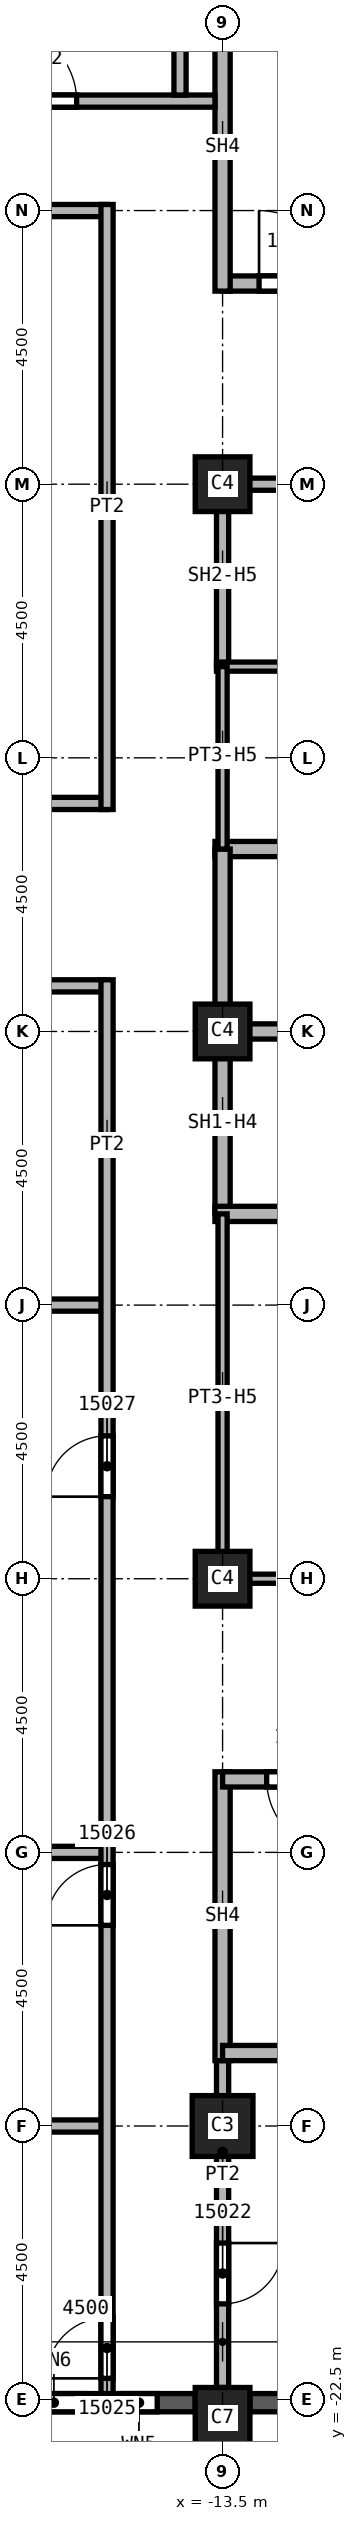
"""IFC4 building model, lengths in metres.
Left out: names, types, materials, properties, quantities, classifications, styles, units other than length and angle.
Written with IfcOpenShell. Run it as: python <this file> out.ifc"""

import sys

from ifc_helpers import new_model, si_unit, direction, frame, frame_2d, origin, origin_2d, place, context, subcontext, project, spatial, rectangle, extrude, element, fill, save


model = new_model("IFC4")
c1 = context("Model", 3, precision=1e-05, world=origin(), true_north=direction((0.0, 1.0)))
c2 = subcontext(c1, "Body", "Model", "MODEL_VIEW")
j1 = project(units=[si_unit("LENGTHUNIT", "METRE"), si_unit("PLANEANGLEUNIT", "RADIAN")], contexts=[c1])
p1 = place(None, origin())
s1 = spatial("IfcSite", under=j1, at=p1, CompositionType="ELEMENT")
p2 = place(p1, origin())
s2 = spatial("IfcBuilding", under=s1, at=p2, CompositionType="ELEMENT")
p3 = place(p2, frame((0.0, 0.0, 228.0)))
s3 = spatial("IfcBuildingStorey", under=s2, at=p3, CompositionType="ELEMENT", Elevation=228.0)
p4 = place(p3, frame((-13.5, -18.0, 0.0), z_axis=(0.0, 0.0, 1.0), x_axis=(1.0, 0.0, 0.0)))
e1 = element("IfcColumn", 1, at=p4, inside=s3, PredefinedType="COLUMN", context=c2, shape_type="SweptSolid", body=[
    extrude(rectangle(XDim=1.0, YDim=1.0, at=origin_2d()), origin(), (0.0, 0.0, 1.0), 3.72),
])
for number, where, z_axis, x_axis in (
    (2, (-13.5, 0.0, 0.0), (0.0, 0.0, 1.0), (1.0, 0.0, 0.0)),
    (3, (-13.5, 9.0, 0.0), (0.0, 0.0, 1.0), (1.0, 0.0, 0.0)),
    (4, (-13.5, -9.0, 0.0), (0.0, 0.0, 1.0), (1.0, 0.0, 0.0)),
):
    element("IfcColumn", number, at=place(p3, frame(where, z_axis=z_axis, x_axis=x_axis)), inside=s3, PredefinedType="COLUMN", context=c2, shape_type="SweptSolid", body=[
        extrude(rectangle(XDim=0.9, YDim=0.9, at=origin_2d()), origin(), (0.0, 0.0, 1.0), 3.72),
    ])
p5 = place(p3, frame((-13.5, -22.8, 0.0), z_axis=(0.0, 0.0, 1.0), x_axis=(1.0, 0.0, 0.0)))
e5 = element("IfcColumn", 5, at=p5, inside=s3, PredefinedType="COLUMN", context=c2, shape_type="SweptSolid", body=[
    extrude(rectangle(XDim=0.9, YDim=1.0, at=origin_2d()), origin(), (0.0, 0.0, 1.0), 3.72),
])
p6 = place(p3, frame((-17.55, -22.55, 0.0), z_axis=(0.0, 0.0, 1.0), x_axis=(1.0, 0.0, 0.0)))
e6 = element("IfcWall", 6, at=p6, inside=s3, PredefinedType="SOLIDWALL", context=c2, shape_type="SweptSolid", body=[
    extrude(rectangle(XDim=3.6, YDim=0.3, at=frame_2d((1.8, 0.0))), origin(), (0.0, 0.0, 1.0), 3.12),
])
p7 = place(p6, frame((0.775, 0.0, 0.8)))
e7 = element("IfcOpeningElement", 7, at=p7, cuts=e6, PredefinedType="OPENING", context=c2, shape_type="SweptSolid", body=[
    extrude(rectangle(XDim=1.0, YDim=1.95, at=frame_2d((0.5, 0.975))), frame((0.0, 0.15, 0.0), z_axis=(0.0, -1.0, 0.0), x_axis=(1.0, 0.0, 0.0)), (0.0, 0.0, 1.0), 0.3),
])
p8 = place(p6, frame((2.375, 0.0, 0.8)))
e8 = element("IfcOpeningElement", 8, at=p8, cuts=e6, PredefinedType="OPENING", context=c2, shape_type="SweptSolid", body=[
    extrude(rectangle(XDim=0.6, YDim=1.95, at=frame_2d((0.3, 0.975))), frame((0.0, 0.15, 0.0), z_axis=(0.0, -1.0, 0.0), x_axis=(1.0, 0.0, 0.0)), (0.0, 0.0, 1.0), 0.3),
])
p9 = place(p3, frame((-13.05, -22.55, 0.0), z_axis=(0.0, 0.0, 1.0), x_axis=(1.0, 0.0, 0.0)))
e9 = element("IfcWall", 9, at=p9, inside=s3, PredefinedType="SOLIDWALL", context=c2, shape_type="SweptSolid", body=[
    extrude(rectangle(XDim=3.6, YDim=0.3, at=frame_2d((1.8, 0.0))), origin(), (0.0, 0.0, 1.0), 3.12),
])
p10 = place(p9, frame((0.6, 0.0, 0.8)))
e10 = element("IfcOpeningElement", 10, at=p10, cuts=e9, PredefinedType="OPENING", context=c2, shape_type="SweptSolid", body=[
    extrude(rectangle(XDim=2.4, YDim=1.95, at=frame_2d((1.2, 0.975))), frame((0.0, 0.15, 0.0), z_axis=(0.0, -1.0, 0.0), x_axis=(1.0, 0.0, 0.0)), (0.0, 0.0, 1.0), 0.3),
])
p11 = place(p3, frame((-33.85, 3.75, 0.0), z_axis=(0.0, 0.0, 1.0), x_axis=(1.0, 0.0, 0.0)))
e11 = element("IfcWall", 11, at=p11, inside=s3, PredefinedType="PARTITIONING", context=c2, shape_type="SweptSolid", body=[
    extrude(rectangle(XDim=18.45, YDim=0.2, at=frame_2d((9.225, 0.0))), origin(), (0.0, 0.0, 1.0), 3.72),
])
p12 = place(p11, frame((11.2, 0.0, 0.0)))
e12 = element("IfcOpeningElement", 12, at=p12, cuts=e11, PredefinedType="OPENING", context=c2, shape_type="SweptSolid", body=[
    extrude(rectangle(XDim=1.0, YDim=2.1, at=frame_2d((0.5, 1.05))), frame((0.0, 0.1, 0.0), z_axis=(0.0, -1.0, 0.0), x_axis=(1.0, 0.0, 0.0)), (0.0, 0.0, 1.0), 0.2),
])
p13 = place(p3, frame((-15.4, 0.75, 0.0), z_axis=(0.0, 0.0, 1.0), x_axis=(-1.0, 0.0, 0.0)))
e13 = element("IfcWall", 13, at=p13, inside=s3, PredefinedType="PARTITIONING", context=c2, shape_type="SweptSolid", body=[
    extrude(rectangle(XDim=18.45, YDim=0.2, at=frame_2d((9.225, 0.0))), origin(), (0.0, 0.0, 1.0), 3.72),
])
p14 = place(p13, frame((5.35, 0.0, 0.0)))
e14 = element("IfcOpeningElement", 14, at=p14, cuts=e13, PredefinedType="OPENING", context=c2, shape_type="SweptSolid", body=[
    extrude(rectangle(XDim=1.0, YDim=2.1, at=frame_2d((0.5, 1.05))), frame((0.0, 0.1, 0.0), z_axis=(0.0, -1.0, 0.0), x_axis=(1.0, 0.0, 0.0)), (0.0, 0.0, 1.0), 0.2),
])
p15 = place(p13, frame((12.35, 0.0, 0.0)))
e15 = element("IfcOpeningElement", 15, at=p15, cuts=e13, PredefinedType="OPENING", context=c2, shape_type="SweptSolid", body=[
    extrude(rectangle(XDim=1.0, YDim=2.1, at=frame_2d((0.5, 1.05))), frame((0.0, 0.1, 0.0), z_axis=(0.0, -1.0, 0.0), x_axis=(1.0, 0.0, 0.0)), (0.0, 0.0, 1.0), 0.2),
])
p16 = place(p3, frame((-27.1, -4.5, 0.0), z_axis=(0.0, 0.0, 1.0), x_axis=(1.0, 0.0, 0.0)))
e16 = element("IfcWall", 16, at=p16, inside=s3, PredefinedType="PARTITIONING", context=c2, shape_type="SweptSolid", body=[
    extrude(rectangle(XDim=11.7, YDim=0.2, at=frame_2d((5.85, 0.0))), origin(), (0.0, 0.0, 1.0), 3.72),
])
p17 = place(p3, frame((-24.25, -18.0, 0.0), z_axis=(0.0, 0.0, 1.0), x_axis=(1.0, 0.0, 0.0)))
e17 = element("IfcWall", 17, at=p17, inside=s3, PredefinedType="PARTITIONING", context=c2, shape_type="SweptSolid", body=[
    extrude(rectangle(XDim=8.85, YDim=0.2, at=frame_2d((4.425, 0.0))), origin(), (0.0, 0.0, 1.0), 3.72),
])
p18 = place(p3, frame((-20.75, -13.5, 0.0), z_axis=(0.0, 0.0, 1.0), x_axis=(1.0, 0.0, 0.0)))
e18 = element("IfcWall", 18, at=p18, inside=s3, PredefinedType="PARTITIONING", context=c2, shape_type="SweptSolid", body=[
    extrude(rectangle(XDim=5.35, YDim=0.2, at=frame_2d((2.675, 0.0))), origin(), (0.0, 0.0, 1.0), 3.72),
])
p19 = place(p3, frame((-15.4, 13.5, 0.0), z_axis=(0.0, 0.0, 1.0), x_axis=(-1.0, 0.0, 0.0)))
e19 = element("IfcWall", 19, at=p19, inside=s3, PredefinedType="PARTITIONING", context=c2, shape_type="SweptSolid", body=[
    extrude(rectangle(XDim=6.6, YDim=0.2, at=frame_2d((3.3, 0.0))), origin(), (0.0, 0.0, 1.0), 3.72),
])
p20 = place(p19, frame((5.37, 0.0, 0.0)))
e20 = element("IfcOpeningElement", 20, at=p20, cuts=e19, PredefinedType="OPENING", context=c2, shape_type="SweptSolid", body=[
    extrude(rectangle(XDim=0.9, YDim=2.1, at=frame_2d((0.45, 1.05))), frame((0.0, 0.1, 0.0), z_axis=(0.0, -1.0, 0.0), x_axis=(1.0, 0.0, 0.0)), (0.0, 0.0, 1.0), 0.2),
])
p21 = place(p3, frame((-15.4, -22.4, 0.0), z_axis=(0.0, 0.0, 1.0), x_axis=(0.0, 1.0, 0.0)))
e21 = element("IfcWall", 21, at=p21, inside=s3, PredefinedType="PARTITIONING", context=c2, shape_type="SweptSolid", body=[
    extrude(rectangle(XDim=23.25, YDim=0.2, at=frame_2d((11.625, 0.0))), origin(), (0.0, 0.0, 1.0), 3.72),
])
p22 = place(p21, frame((0.25, 0.0, 0.0)))
e22 = element("IfcOpeningElement", 22, at=p22, cuts=e21, PredefinedType="OPENING", context=c2, shape_type="SweptSolid", body=[
    extrude(rectangle(XDim=1.0, YDim=2.1, at=frame_2d((0.5, 1.05))), frame((0.0, 0.1, 0.0), z_axis=(0.0, -1.0, 0.0), x_axis=(1.0, 0.0, 0.0)), (0.0, 0.0, 1.0), 0.2),
])
p23 = place(p21, frame((7.7, 0.0, 0.0)))
e23 = element("IfcOpeningElement", 23, at=p23, cuts=e21, PredefinedType="OPENING", context=c2, shape_type="SweptSolid", body=[
    extrude(rectangle(XDim=1.0, YDim=2.1, at=frame_2d((0.5, 1.05))), frame((0.0, 0.1, 0.0), z_axis=(0.0, -1.0, 0.0), x_axis=(1.0, 0.0, 0.0)), (0.0, 0.0, 1.0), 0.2),
])
p24 = place(p21, frame((14.75, 0.0, 0.0)))
e24 = element("IfcOpeningElement", 24, at=p24, cuts=e21, PredefinedType="OPENING", context=c2, shape_type="SweptSolid", body=[
    extrude(rectangle(XDim=1.0, YDim=2.1, at=frame_2d((0.5, 1.05))), frame((0.0, 0.1, 0.0), z_axis=(0.0, -1.0, 0.0), x_axis=(1.0, 0.0, 0.0)), (0.0, 0.0, 1.0), 0.2),
])
p25 = place(p3, frame((-15.4, 3.65, 0.0), z_axis=(0.0, 0.0, 1.0), x_axis=(0.0, 1.0, 0.0)))
e25 = element("IfcWall", 25, at=p25, inside=s3, PredefinedType="PARTITIONING", context=c2, shape_type="SweptSolid", body=[
    extrude(rectangle(XDim=9.95, YDim=0.2, at=frame_2d((4.975, 0.0))), origin(), (0.0, 0.0, 1.0), 3.72),
])
p26 = place(p3, frame((-13.5, -16.675, 0.0), z_axis=(0.0, 0.0, 1.0), x_axis=(0.0, -1.0, 0.0)))
e26 = element("IfcWall", 26, at=p26, inside=s3, PredefinedType="PARTITIONING", context=c2, shape_type="SweptSolid", body=[
    extrude(rectangle(XDim=5.625, YDim=0.2, at=frame_2d((2.812, 0.0))), origin(), (0.0, 0.0, 1.0), 3.72),
])
p27 = place(p26, frame((3.25, 0.0, 0.0)))
e27 = element("IfcOpeningElement", 27, at=p27, cuts=e26, PredefinedType="OPENING", context=c2, shape_type="SweptSolid", body=[
    extrude(rectangle(XDim=1.0, YDim=2.1, at=frame_2d((0.5, 1.05))), frame((0.0, 0.1, 0.0), z_axis=(0.0, -1.0, 0.0), x_axis=(1.0, 0.0, 0.0)), (0.0, 0.0, 1.0), 0.2),
])
p28 = place(p3, frame((-13.5, 6.0, 0.0), z_axis=(0.0, 0.0, 1.0), x_axis=(0.0, 1.0, 0.0)))
e28 = element("IfcWall", 28, at=p28, inside=s3, PredefinedType="SOLIDWALL", context=c2, shape_type="SweptSolid", body=[
    extrude(rectangle(XDim=3.1, YDim=0.2, at=frame_2d((1.55, 0.0))), origin(), (0.0, 0.0, 1.0), 2.958),
])
p29 = place(p3, frame((-13.5, 9.0, 0.0), z_axis=(0.0, 0.0, 1.0), x_axis=(1.0, 0.0, 0.0)))
e29 = element("IfcWall", 29, at=p29, inside=s3, PredefinedType="SOLIDWALL", context=c2, shape_type="SweptSolid", body=[
    extrude(rectangle(XDim=3.0, YDim=0.2, at=frame_2d((1.5, 0.0))), origin(), (0.0, 0.0, 1.0), 2.958),
])
p30 = place(p3, frame((-13.625, 0.0, 0.0), z_axis=(0.0, 0.0, 1.0), x_axis=(1.0, 0.0, 0.0)))
e30 = element("IfcWall", 30, at=p30, inside=s3, PredefinedType="SOLIDWALL", context=c2, shape_type="SweptSolid", body=[
    extrude(rectangle(XDim=3.125, YDim=0.25, at=frame_2d((1.562, 0.0))), origin(), (0.0, 0.0, 1.0), 3.72),
])
p31 = place(p3, frame((-13.625, 3.0, 0.0), z_axis=(0.0, 0.0, 1.0), x_axis=(1.0, 0.0, 0.0)))
e31 = element("IfcWall", 31, at=p31, inside=s3, PredefinedType="SOLIDWALL", context=c2, shape_type="SweptSolid", body=[
    extrude(rectangle(XDim=9.25, YDim=0.25, at=frame_2d((4.625, 0.0))), origin(), (0.0, 0.0, 1.0), 3.72),
])
p32 = place(p31, frame((3.25, 0.0, 0.0)))
e32 = element("IfcOpeningElement", 32, at=p32, cuts=e31, PredefinedType="OPENING", context=c2, shape_type="SweptSolid", body=[
    extrude(rectangle(XDim=1.1, YDim=2.1, at=frame_2d((0.55, 1.05))), frame((0.0, 0.125, 0.0), z_axis=(0.0, -1.0, 0.0), x_axis=(1.0, 0.0, 0.0)), (0.0, 0.0, 1.0), 0.25),
])
p33 = place(p3, frame((-13.5, -3.0, 0.0), z_axis=(0.0, 0.0, 1.0), x_axis=(0.0, 1.0, 0.0)))
e33 = element("IfcWall", 33, at=p33, inside=s3, PredefinedType="SOLIDWALL", context=c2, shape_type="SweptSolid", body=[
    extrude(rectangle(XDim=6.0, YDim=0.25, at=frame_2d((3.0, 0.0))), origin(), (0.0, 0.0, 1.0), 2.958),
])
p34 = place(p3, frame((-13.625, -3.0, 0.0), z_axis=(0.0, 0.0, 1.0), x_axis=(1.0, 0.0, 0.0)))
e34 = element("IfcWall", 34, at=p34, inside=s3, PredefinedType="SOLIDWALL", context=c2, shape_type="SweptSolid", body=[
    extrude(rectangle(XDim=6.125, YDim=0.25, at=frame_2d((3.062, 0.0))), origin(), (0.0, 0.0, 1.0), 3.72),
])
p35 = place(p34, frame((3.25, 0.0, 0.0)))
e35 = element("IfcOpeningElement", 35, at=p35, cuts=e34, PredefinedType="OPENING", context=c2, shape_type="SweptSolid", body=[
    extrude(rectangle(XDim=1.1, YDim=2.1, at=frame_2d((0.55, 1.05))), frame((0.0, 0.125, 0.0), z_axis=(0.0, -1.0, 0.0), x_axis=(1.0, 0.0, 0.0)), (0.0, 0.0, 1.0), 0.25),
])
p36 = place(p3, frame((-13.5, -12.175, 0.0), z_axis=(0.0, 0.0, 1.0), x_axis=(0.0, -1.0, 0.0)))
e36 = element("IfcWall", 36, at=p36, inside=s3, PredefinedType="SOLIDWALL", context=c2, shape_type="SweptSolid", body=[
    extrude(rectangle(XDim=4.75, YDim=0.25, at=frame_2d((2.375, 0.0))), origin(), (0.0, 0.0, 1.0), 3.72),
])
p37 = place(p3, frame((-13.5, 12.3, 0.0), z_axis=(0.0, 0.0, 1.0), x_axis=(1.0, 0.0, 0.0)))
e37 = element("IfcWall", 37, at=p37, inside=s3, PredefinedType="SOLIDWALL", context=c2, shape_type="SweptSolid", body=[
    extrude(rectangle(XDim=9.125, YDim=0.25, at=frame_2d((4.562, 0.0))), origin(), (0.0, 0.0, 1.0), 3.72),
])
p38 = place(p37, frame((0.6, 0.0, 0.0)))
e38 = element("IfcOpeningElement", 38, at=p38, cuts=e37, PredefinedType="OPENING", context=c2, shape_type="SweptSolid", body=[
    extrude(rectangle(XDim=1.2, YDim=2.1, at=frame_2d((0.6, 1.05))), frame((0.0, 0.125, 0.0), z_axis=(0.0, -1.0, 0.0), x_axis=(1.0, 0.0, 0.0)), (0.0, 0.0, 1.0), 0.25),
])
p39 = place(p3, frame((-13.5, 16.78, 0.0), z_axis=(0.0, 0.0, 1.0), x_axis=(0.0, -1.0, 0.0)))
e39 = element("IfcWall", 39, at=p39, inside=s3, PredefinedType="SOLIDWALL", context=c2, shape_type="SweptSolid", body=[
    extrude(rectangle(XDim=4.605, YDim=0.25, at=frame_2d((2.302, 0.0))), origin(), (0.0, 0.0, 1.0), 3.72),
])
p40 = place(p3, frame((-4.5, -16.8, 0.0), z_axis=(0.0, 0.0, 1.0), x_axis=(-1.0, 0.0, 0.0)))
e40 = element("IfcWall", 40, at=p40, inside=s3, PredefinedType="SOLIDWALL", context=c2, shape_type="SweptSolid", body=[
    extrude(rectangle(XDim=9.0, YDim=0.25, at=frame_2d((4.5, 0.0))), origin(), (0.0, 0.0, 1.0), 3.72),
])
p41 = place(p3, frame((-4.375, -12.3, 0.0), z_axis=(0.0, 0.0, 1.0), x_axis=(-1.0, 0.0, 0.0)))
e41 = element("IfcWall", 41, at=p41, inside=s3, PredefinedType="SOLIDWALL", context=c2, shape_type="SweptSolid", body=[
    extrude(rectangle(XDim=9.125, YDim=0.25, at=frame_2d((4.562, 0.0))), origin(), (0.0, 0.0, 1.0), 3.72),
])
p42 = place(p41, frame((7.2, 0.0, 0.0)))
e42 = element("IfcOpeningElement", 42, at=p42, cuts=e41, PredefinedType="OPENING", context=c2, shape_type="SweptSolid", body=[
    extrude(rectangle(XDim=1.2, YDim=2.1, at=frame_2d((0.6, 1.05))), frame((0.0, 0.125, 0.0), z_axis=(0.0, -1.0, 0.0), x_axis=(1.0, 0.0, 0.0)), (0.0, 0.0, 1.0), 0.25),
])
p43 = place(p3, frame((-13.6, 6.0, 0.0), z_axis=(0.0, 0.0, 1.0), x_axis=(1.0, 0.0, 0.0)))
e43 = element("IfcWall", 43, at=p43, inside=s3, PredefinedType="PARTITIONING", context=c2, shape_type="SweptSolid", body=[
    extrude(rectangle(XDim=3.1, YDim=0.15, at=frame_2d((1.55, 0.0))), origin(), (0.0, 0.0, 1.0), 3.72),
])
p44 = place(p3, frame((-13.5, -9.075, 0.0), z_axis=(0.0, 0.0, 1.0), x_axis=(0.0, 1.0, 0.0)))
e44 = element("IfcWall", 44, at=p44, inside=s3, PredefinedType="PARTITIONING", context=c2, shape_type="SweptSolid", body=[
    extrude(rectangle(XDim=6.075, YDim=0.15, at=frame_2d((3.038, 0.0))), origin(), (0.0, 0.0, 1.0), 2.958),
])
for number, where, z_axis, x_axis in (
    (45, (-13.5, 3.0, 0.0), (0.0, 0.0, 1.0), (0.0, 1.0, 0.0)),
    (46, (-10.5, -9.0, 0.0), (0.0, 0.0, 1.0), (-1.0, 0.0, 0.0)),
):
    element("IfcWall", number, at=place(p3, frame(where, z_axis=z_axis, x_axis=x_axis)), inside=s3, PredefinedType="PARTITIONING", context=c2, shape_type="SweptSolid", body=[
        extrude(rectangle(XDim=3.0, YDim=0.15, at=frame_2d((1.5, 0.0))), origin(), (0.0, 0.0, 1.0), 2.958),
    ])
p45 = place(p3, frame((-21.9, 15.3, 0.0), z_axis=(0.0, 0.0, 1.0), x_axis=(1.0, 0.0, 0.0)))
e47 = element("IfcWall", 47, at=p45, inside=s3, PredefinedType="SOLIDWALL", context=c2, shape_type="SweptSolid", body=[
    extrude(rectangle(XDim=8.275, YDim=0.2, at=frame_2d((4.137, 0.0))), origin(), (0.0, 0.0, 1.0), 3.72),
])
p46 = place(p45, frame((4.8, 0.0, 0.0)))
e48 = element("IfcOpeningElement", 48, at=p46, cuts=e47, PredefinedType="OPENING", context=c2, shape_type="SweptSolid", body=[
    extrude(rectangle(XDim=1.2, YDim=2.1, at=frame_2d((0.6, 1.05))), frame((0.0, 0.1, 0.0), z_axis=(0.0, -1.0, 0.0), x_axis=(1.0, 0.0, 0.0)), (0.0, 0.0, 1.0), 0.2),
])
p47 = place(p3, frame((-14.2, 15.4, 0.0), z_axis=(0.0, 0.0, 1.0), x_axis=(0.0, 1.0, 0.0)))
e49 = element("IfcWall", 49, at=p47, inside=s3, PredefinedType="SOLIDWALL", context=c2, shape_type="SweptSolid", body=[
    extrude(rectangle(XDim=5.9, YDim=0.2, at=frame_2d((2.95, 0.0))), origin(), (0.0, 0.0, 1.0), 3.72),
])
p48 = place(p38, origin())
e50 = element("IfcDoor", 50, at=p48, inside=s3, OperationType="SINGLE_SWING_RIGHT", PredefinedType="DOOR", context=c2, shape_type="SweptSolid", body=[
    extrude(rectangle(XDim=1.2, YDim=2.1, at=frame_2d((0.6, 1.05))), frame((0.0, 0.025, 0.0), z_axis=(0.0, -1.0, 0.0), x_axis=(1.0, 0.0, 0.0)), (0.0, 0.0, 1.0), 0.05),
])
fill(e38, e50)
p49 = place(p42, origin())
e51 = element("IfcDoor", 51, at=p49, inside=s3, OperationType="SINGLE_SWING_LEFT", PredefinedType="DOOR", context=c2, shape_type="SweptSolid", body=[
    extrude(rectangle(XDim=1.2, YDim=2.1, at=frame_2d((0.6, 1.05))), frame((0.0, 0.025, 0.0), z_axis=(0.0, -1.0, 0.0), x_axis=(1.0, 0.0, 0.0)), (0.0, 0.0, 1.0), 0.05),
])
fill(e42, e51)
p50 = place(p27, origin())
e52 = element("IfcDoor", 52, at=p50, inside=s3, OperationType="SINGLE_SWING_LEFT", PredefinedType="DOOR", context=c2, shape_type="SweptSolid", body=[
    extrude(rectangle(XDim=1.0, YDim=2.1, at=frame_2d((0.5, 1.05))), frame((0.0, 0.025, 0.0), z_axis=(0.0, -1.0, 0.0), x_axis=(1.0, 0.0, 0.0)), (0.0, 0.0, 1.0), 0.05),
])
fill(e27, e52)
p51 = place(p22, origin())
e53 = element("IfcDoor", 53, at=p51, inside=s3, OperationType="SINGLE_SWING_RIGHT", PredefinedType="DOOR", context=c2, shape_type="SweptSolid", body=[
    extrude(rectangle(XDim=1.0, YDim=2.1, at=frame_2d((0.5, 1.05))), frame((0.0, 0.025, 0.0), z_axis=(0.0, -1.0, 0.0), x_axis=(1.0, 0.0, 0.0)), (0.0, 0.0, 1.0), 0.05),
])
fill(e22, e53)
p52 = place(p23, origin())
e54 = element("IfcDoor", 54, at=p52, inside=s3, OperationType="SINGLE_SWING_LEFT", PredefinedType="DOOR", context=c2, shape_type="SweptSolid", body=[
    extrude(rectangle(XDim=1.0, YDim=2.1, at=frame_2d((0.5, 1.05))), frame((0.0, 0.025, 0.0), z_axis=(0.0, -1.0, 0.0), x_axis=(1.0, 0.0, 0.0)), (0.0, 0.0, 1.0), 0.05),
])
fill(e23, e54)
p53 = place(p24, origin())
e55 = element("IfcDoor", 55, at=p53, inside=s3, OperationType="SINGLE_SWING_RIGHT", PredefinedType="DOOR", context=c2, shape_type="SweptSolid", body=[
    extrude(rectangle(XDim=1.0, YDim=2.1, at=frame_2d((0.5, 1.05))), frame((0.0, 0.025, 0.0), z_axis=(0.0, -1.0, 0.0), x_axis=(1.0, 0.0, 0.0)), (0.0, 0.0, 1.0), 0.05),
])
fill(e24, e55)
p54 = place(p46, origin())
e56 = element("IfcDoor", 56, at=p54, inside=s3, OperationType="SINGLE_SWING_RIGHT", PredefinedType="DOOR", context=c2, shape_type="SweptSolid", body=[
    extrude(rectangle(XDim=1.2, YDim=2.1, at=frame_2d((0.6, 1.05))), frame((0.0, 0.025, 0.0), z_axis=(0.0, -1.0, 0.0), x_axis=(1.0, 0.0, 0.0)), (0.0, 0.0, 1.0), 0.05),
])
fill(e48, e56)
p55 = place(p7, origin())
e57 = element("IfcWindow", 57, at=p55, inside=s3, PartitioningType="SINGLE_PANEL", PredefinedType="WINDOW", context=c2, shape_type="SweptSolid", body=[
    extrude(rectangle(XDim=1.0, YDim=1.95, at=frame_2d((0.5, 0.975))), frame((0.0, 0.03, 0.0), z_axis=(0.0, -1.0, 0.0), x_axis=(1.0, 0.0, 0.0)), (0.0, 0.0, 1.0), 0.06),
])
fill(e7, e57)
p56 = place(p8, origin())
e58 = element("IfcWindow", 58, at=p56, inside=s3, PartitioningType="SINGLE_PANEL", PredefinedType="WINDOW", context=c2, shape_type="SweptSolid", body=[
    extrude(rectangle(XDim=0.6, YDim=1.95, at=frame_2d((0.3, 0.975))), frame((0.0, 0.03, 0.0), z_axis=(0.0, -1.0, 0.0), x_axis=(1.0, 0.0, 0.0)), (0.0, 0.0, 1.0), 0.06),
])
fill(e8, e58)
save(model, sys.argv[1])
